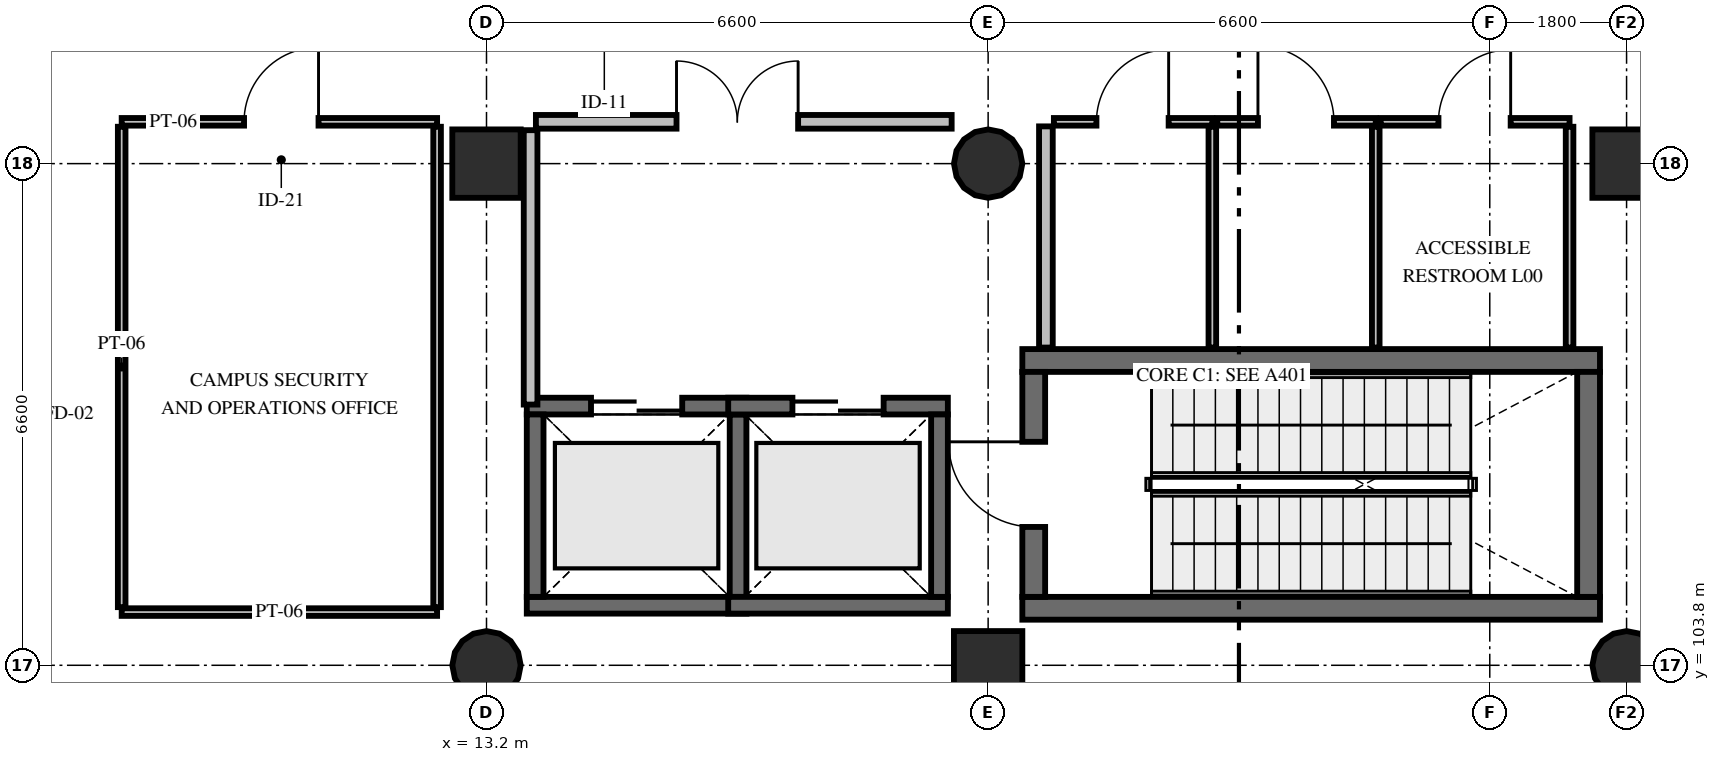
"""IFC4 building model, lengths in metres.
Left out: names, types, materials, properties, quantities, classifications, styles, units other than length and angle.
Written with IfcOpenShell. Run it as: python <this file> out.ifc"""

import sys

from ifc_helpers import new_model, si_unit, direction, frame, frame_2d, origin, origin_2d, place, context, subcontext, project, spatial, rectangle, circle, extrude, element, fill, save


model = new_model("IFC4")
c1 = context("Model", 3, precision=1e-05, world=origin(), true_north=direction((0.0, 1.0)))
c2 = subcontext(c1, "Body", "Model", "MODEL_VIEW")
j1 = project(units=[si_unit("LENGTHUNIT", "METRE"), si_unit("PLANEANGLEUNIT", "RADIAN")], contexts=[c1])
p1 = place(None, origin())
s1 = spatial("IfcSite", under=j1, at=p1, CompositionType="ELEMENT")
p2 = place(p1, origin())
s2 = spatial("IfcBuilding", under=s1, at=p2, CompositionType="ELEMENT")
p3 = place(p2, origin())
s3 = spatial("IfcBuildingStorey", under=s2, at=p3, CompositionType="ELEMENT", Elevation=0.0)
p4 = place(p3, frame((13.2, 103.8, 0.0), z_axis=(0.0, 0.0, 1.0), x_axis=(1.0, 0.0, 0.0)))
e1 = element("IfcColumn", 1, at=p4, inside=s3, PredefinedType="COLUMN", context=c2, shape_type="SweptSolid", body=[
    extrude(circle(Radius=0.45, at=origin_2d()), origin(), (0.0, 0.0, 1.0), 5.4),
])
for number, where, z_axis, x_axis in (
    (2, (13.2, 110.4, 0.0), (0.0, 0.0, 1.0), (1.0, 0.0, 0.0)),
    (3, (19.8, 103.8, 0.0), (0.0, 0.0, 1.0), (1.0, 0.0, 0.0)),
):
    element("IfcColumn", number, at=place(p3, frame(where, z_axis=z_axis, x_axis=x_axis)), inside=s3, PredefinedType="COLUMN", context=c2, shape_type="SweptSolid", body=[
        extrude(rectangle(XDim=0.9, YDim=0.9, at=origin_2d()), origin(), (0.0, 0.0, 1.0), 5.4),
    ])
for number, where, z_axis, x_axis in (
    (4, (19.8, 110.4, 0.0), (0.0, 0.0, 1.0), (1.0, 0.0, 0.0)),
    (5, (28.2, 103.8, 0.0), (0.0, 0.0, 1.0), (1.0, 0.0, 0.0)),
):
    element("IfcColumn", number, at=place(p3, frame(where, z_axis=z_axis, x_axis=x_axis)), inside=s3, PredefinedType="COLUMN", context=c2, shape_type="SweptSolid", body=[
        extrude(circle(Radius=0.45, at=origin_2d()), origin(), (0.0, 0.0, 1.0), 5.4),
    ])
p5 = place(p3, frame((28.2, 110.4, 0.0), z_axis=(0.0, 0.0, 1.0), x_axis=(1.0, 0.0, 0.0)))
e6 = element("IfcColumn", 6, at=p5, inside=s3, PredefinedType="COLUMN", context=c2, shape_type="SweptSolid", body=[
    extrude(rectangle(XDim=0.9, YDim=0.9, at=origin_2d()), origin(), (0.0, 0.0, 1.0), 5.4),
])
for number, where, z_axis, x_axis in (
    (7, (20.25, 104.55, 0.0), (0.0, 0.0, 1.0), (1.0, 0.0, 0.0)),
    (8, (20.25, 107.81, 0.0), (0.0, 0.0, 1.0), (1.0, 0.0, 0.0)),
):
    element("IfcWall", number, at=place(p3, frame(where, z_axis=z_axis, x_axis=x_axis)), inside=s3, PredefinedType="SHEAR", context=c2, shape_type="SweptSolid", body=[
        extrude(rectangle(XDim=7.6, YDim=0.3, at=frame_2d((3.8, 0.0))), origin(), (0.0, 0.0, 1.0), 5.08),
    ])
p6 = place(p3, frame((20.4, 104.7, 0.0), z_axis=(0.0, 0.0, 1.0), x_axis=(0.0, 1.0, 0.0)))
e9 = element("IfcWall", 9, at=p6, inside=s3, PredefinedType="SHEAR", context=c2, shape_type="SweptSolid", body=[
    extrude(rectangle(XDim=2.96, YDim=0.3, at=frame_2d((1.48, 0.0))), origin(), (0.0, 0.0, 1.0), 5.08),
])
p7 = place(p6, frame((0.92, 0.0, 0.0)))
e10 = element("IfcOpeningElement", 10, at=p7, cuts=e9, PredefinedType="OPENING", context=c2, shape_type="SweptSolid", body=[
    extrude(rectangle(XDim=1.12, YDim=2.2, at=frame_2d((0.56, 1.1))), frame((0.0, 0.165, 0.0), z_axis=(0.0, -1.0, 0.0), x_axis=(1.0, 0.0, 0.0)), (0.0, 0.0, 1.0), 0.33),
])
p8 = place(p3, frame((27.7, 104.7, 0.0), z_axis=(0.0, 0.0, 1.0), x_axis=(0.0, 1.0, 0.0)))
e11 = element("IfcWall", 11, at=p8, inside=s3, PredefinedType="SHEAR", context=c2, shape_type="SweptSolid", body=[
    extrude(rectangle(XDim=2.96, YDim=0.3, at=frame_2d((1.48, 0.0))), origin(), (0.0, 0.0, 1.0), 5.08),
])
p9 = place(p3, frame((13.73, 104.59, 0.0), z_axis=(0.0, 0.0, 1.0), x_axis=(1.0, 0.0, 0.0)))
e12 = element("IfcWall", 12, at=p9, inside=s3, PredefinedType="SHEAR", context=c2, shape_type="SweptSolid", body=[
    extrude(rectangle(XDim=2.89, YDim=0.22, at=frame_2d((1.445, 0.0))), origin(), (0.0, 0.0, 1.0), 5.08),
])
p10 = place(p3, frame((13.73, 107.21, 0.0), z_axis=(0.0, 0.0, 1.0), x_axis=(1.0, 0.0, 0.0)))
e13 = element("IfcWall", 13, at=p10, inside=s3, PredefinedType="SHEAR", context=c2, shape_type="SweptSolid", body=[
    extrude(rectangle(XDim=2.89, YDim=0.22, at=frame_2d((1.445, 0.0))), origin(), (0.0, 0.0, 1.0), 5.08),
])
p11 = place(p10, frame((0.845, 0.0, 0.0)))
e14 = element("IfcOpeningElement", 14, at=p11, cuts=e13, PredefinedType="OPENING", context=c2, shape_type="SweptSolid", body=[
    extrude(rectangle(XDim=1.2, YDim=2.2, at=frame_2d((0.6, 1.1))), frame((0.0, 0.125, 0.0), z_axis=(0.0, -1.0, 0.0), x_axis=(1.0, 0.0, 0.0)), (0.0, 0.0, 1.0), 0.25),
])
for number, where, z_axis, x_axis in (
    (15, (13.84, 104.7, 0.0), (0.0, 0.0, 1.0), (0.0, 1.0, 0.0)),
    (16, (16.51, 104.7, 0.0), (0.0, 0.0, 1.0), (0.0, 1.0, 0.0)),
):
    element("IfcWall", number, at=place(p3, frame(where, z_axis=z_axis, x_axis=x_axis)), inside=s3, PredefinedType="SHEAR", context=c2, shape_type="SweptSolid", body=[
        extrude(rectangle(XDim=2.4, YDim=0.22, at=frame_2d((1.2, 0.0))), origin(), (0.0, 0.0, 1.0), 5.08),
    ])
p12 = place(p3, frame((16.38, 104.59, 0.0), z_axis=(0.0, 0.0, 1.0), x_axis=(1.0, 0.0, 0.0)))
e17 = element("IfcWall", 17, at=p12, inside=s3, PredefinedType="SHEAR", context=c2, shape_type="SweptSolid", body=[
    extrude(rectangle(XDim=2.89, YDim=0.22, at=frame_2d((1.445, 0.0))), origin(), (0.0, 0.0, 1.0), 5.08),
])
p13 = place(p3, frame((16.38, 107.21, 0.0), z_axis=(0.0, 0.0, 1.0), x_axis=(1.0, 0.0, 0.0)))
e18 = element("IfcWall", 18, at=p13, inside=s3, PredefinedType="SHEAR", context=c2, shape_type="SweptSolid", body=[
    extrude(rectangle(XDim=2.89, YDim=0.22, at=frame_2d((1.445, 0.0))), origin(), (0.0, 0.0, 1.0), 5.08),
])
p14 = place(p13, frame((0.845, 0.0, 0.0)))
e19 = element("IfcOpeningElement", 19, at=p14, cuts=e18, PredefinedType="OPENING", context=c2, shape_type="SweptSolid", body=[
    extrude(rectangle(XDim=1.2, YDim=2.2, at=frame_2d((0.6, 1.1))), frame((0.0, 0.125, 0.0), z_axis=(0.0, -1.0, 0.0), x_axis=(1.0, 0.0, 0.0)), (0.0, 0.0, 1.0), 0.25),
])
p15 = place(p3, frame((19.16, 104.7, 0.0), z_axis=(0.0, 0.0, 1.0), x_axis=(0.0, 1.0, 0.0)))
e20 = element("IfcWall", 20, at=p15, inside=s3, PredefinedType="SHEAR", context=c2, shape_type="SweptSolid", body=[
    extrude(rectangle(XDim=2.4, YDim=0.22, at=frame_2d((1.2, 0.0))), origin(), (0.0, 0.0, 1.0), 5.08),
])
p16 = place(p3, frame((13.85, 110.95, 0.0), z_axis=(0.0, 0.0, 1.0), x_axis=(1.0, 0.0, 0.0)))
e21 = element("IfcWall", 21, at=p16, inside=s3, PredefinedType="PARTITIONING", context=c2, shape_type="SweptSolid", body=[
    extrude(rectangle(XDim=5.47, YDim=0.18, at=frame_2d((2.735, 0.0))), origin(), (0.0, 0.0, 1.0), 4.895),
])
p17 = place(p16, frame((1.85, 0.0, 0.0)))
e22 = element("IfcOpeningElement", 22, at=p17, cuts=e21, PredefinedType="OPENING", context=c2, shape_type="SweptSolid", body=[
    extrude(rectangle(XDim=1.6, YDim=2.25, at=frame_2d((0.8, 1.125))), frame((0.0, 0.105, 0.0), z_axis=(0.0, -1.0, 0.0), x_axis=(1.0, 0.0, 0.0)), (0.0, 0.0, 1.0), 0.21),
])
p18 = place(p3, frame((13.78, 107.23, 0.0), z_axis=(0.0, 0.0, 1.0), x_axis=(0.0, 1.0, 0.0)))
e23 = element("IfcWall", 23, at=p18, inside=s3, PredefinedType="PARTITIONING", context=c2, shape_type="SweptSolid", body=[
    extrude(rectangle(XDim=3.61, YDim=0.18, at=frame_2d((1.805, 0.0))), origin(), (0.0, 0.0, 1.0), 4.73),
])
p19 = place(p3, frame((20.56, 107.98, 0.0), z_axis=(0.0, 0.0, 1.0), x_axis=(0.0, 1.0, 0.0)))
e24 = element("IfcWall", 24, at=p19, inside=s3, PredefinedType="PARTITIONING", context=c2, shape_type="SweptSolid", body=[
    extrude(rectangle(XDim=2.91, YDim=0.18, at=frame_2d((1.455, 0.0))), origin(), (0.0, 0.0, 1.0), 4.43),
])
p20 = place(p3, frame((20.665, 110.95, 0.0), z_axis=(0.0, 0.0, 1.0), x_axis=(1.0, 0.0, 0.0)))
e25 = element("IfcWall", 25, at=p20, inside=s3, PredefinedType="PARTITIONING", context=c2, shape_type="SweptSolid", body=[
    extrude(rectangle(XDim=2.085, YDim=0.1, at=frame_2d((1.042, 0.0))), origin(), (0.0, 0.0, 1.0), 4.895),
])
p21 = place(p20, frame((0.56, 0.0, 0.0)))
e26 = element("IfcOpeningElement", 26, at=p21, cuts=e25, PredefinedType="OPENING", context=c2, shape_type="SweptSolid", body=[
    extrude(rectangle(XDim=0.95, YDim=2.15, at=frame_2d((0.475, 1.075))), frame((0.0, 0.065, 0.0), z_axis=(0.0, -1.0, 0.0), x_axis=(1.0, 0.0, 0.0)), (0.0, 0.0, 1.0), 0.13),
])
p22 = place(p3, frame((22.75, 107.98, 0.0), z_axis=(0.0, 0.0, 1.0), x_axis=(0.0, 1.0, 0.0)))
e27 = element("IfcWall", 27, at=p22, inside=s3, PredefinedType="PARTITIONING", context=c2, shape_type="SweptSolid", body=[
    extrude(rectangle(XDim=2.905, YDim=0.1, at=frame_2d((1.453, 0.0))), origin(), (0.0, 0.0, 1.0), 4.43),
])
p23 = place(p3, frame((22.815, 110.95, 0.0), z_axis=(0.0, 0.0, 1.0), x_axis=(1.0, 0.0, 0.0)))
e28 = element("IfcWall", 28, at=p23, inside=s3, PredefinedType="PARTITIONING", context=c2, shape_type="SweptSolid", body=[
    extrude(rectangle(XDim=2.085, YDim=0.1, at=frame_2d((1.042, 0.0))), origin(), (0.0, 0.0, 1.0), 5.06),
])
p24 = place(p23, frame((0.535, 0.0, 0.0)))
e29 = element("IfcOpeningElement", 29, at=p24, cuts=e28, PredefinedType="OPENING", context=c2, shape_type="SweptSolid", body=[
    extrude(rectangle(XDim=1.0, YDim=2.15, at=frame_2d((0.5, 1.075))), frame((0.0, 0.065, 0.0), z_axis=(0.0, -1.0, 0.0), x_axis=(1.0, 0.0, 0.0)), (0.0, 0.0, 1.0), 0.13),
])
p25 = place(p3, frame((24.9, 107.98, 0.0), z_axis=(0.0, 0.0, 1.0), x_axis=(0.0, 1.0, 0.0)))
e30 = element("IfcWall", 30, at=p25, inside=s3, PredefinedType="PARTITIONING", context=c2, shape_type="SweptSolid", body=[
    extrude(rectangle(XDim=2.905, YDim=0.1, at=frame_2d((1.453, 0.0))), origin(), (0.0, 0.0, 1.0), 4.43),
])
p26 = place(p3, frame((24.965, 110.95, 0.0), z_axis=(0.0, 0.0, 1.0), x_axis=(1.0, 0.0, 0.0)))
e31 = element("IfcWall", 31, at=p26, inside=s3, PredefinedType="PARTITIONING", context=c2, shape_type="SweptSolid", body=[
    extrude(rectangle(XDim=2.485, YDim=0.1, at=frame_2d((1.242, 0.0))), origin(), (0.0, 0.0, 1.0), 4.895),
])
p27 = place(p26, frame((0.76, 0.0, 0.0)))
e32 = element("IfcOpeningElement", 32, at=p27, cuts=e31, PredefinedType="OPENING", context=c2, shape_type="SweptSolid", body=[
    extrude(rectangle(XDim=0.95, YDim=2.15, at=frame_2d((0.475, 1.075))), frame((0.0, 0.065, 0.0), z_axis=(0.0, -1.0, 0.0), x_axis=(1.0, 0.0, 0.0)), (0.0, 0.0, 1.0), 0.13),
])
p28 = place(p3, frame((27.45, 107.98, 0.0), z_axis=(0.0, 0.0, 1.0), x_axis=(0.0, 1.0, 0.0)))
e33 = element("IfcWall", 33, at=p28, inside=s3, PredefinedType="PARTITIONING", context=c2, shape_type="SweptSolid", body=[
    extrude(rectangle(XDim=2.905, YDim=0.1, at=frame_2d((1.453, 0.0))), origin(), (0.0, 0.0, 1.0), 4.43),
])
p29 = place(p3, frame((8.4, 104.5, 0.0), z_axis=(0.0, 0.0, 1.0), x_axis=(1.0, 0.0, 0.0)))
e34 = element("IfcWall", 34, at=p29, inside=s3, PredefinedType="PARTITIONING", context=c2, shape_type="SweptSolid", body=[
    extrude(rectangle(XDim=4.15, YDim=0.1, at=frame_2d((2.075, 0.0))), origin(), (0.0, 0.0, 1.0), 4.895),
])
p30 = place(p3, frame((8.4, 110.95, 0.0), z_axis=(0.0, 0.0, 1.0), x_axis=(1.0, 0.0, 0.0)))
e35 = element("IfcWall", 35, at=p30, inside=s3, PredefinedType="PARTITIONING", context=c2, shape_type="SweptSolid", body=[
    extrude(rectangle(XDim=4.15, YDim=0.1, at=frame_2d((2.075, 0.0))), origin(), (0.0, 0.0, 1.0), 4.895),
])
p31 = place(p30, frame((1.61, 0.0, 0.0)))
e36 = element("IfcOpeningElement", 36, at=p31, cuts=e35, PredefinedType="OPENING", context=c2, shape_type="SweptSolid", body=[
    extrude(rectangle(XDim=0.98, YDim=2.2, at=frame_2d((0.49, 1.1))), frame((0.0, 0.065, 0.0), z_axis=(0.0, -1.0, 0.0), x_axis=(1.0, 0.0, 0.0)), (0.0, 0.0, 1.0), 0.13),
])
for number, where, z_axis, x_axis in (
    (37, (8.4, 104.565, 0.0), (0.0, 0.0, 1.0), (0.0, 1.0, 0.0)),
    (38, (12.55, 104.565, 0.0), (0.0, 0.0, 1.0), (0.0, 1.0, 0.0)),
):
    element("IfcWall", number, at=place(p3, frame(where, z_axis=z_axis, x_axis=x_axis)), inside=s3, PredefinedType="PARTITIONING", context=c2, shape_type="SweptSolid", body=[
        extrude(rectangle(XDim=6.32, YDim=0.1, at=frame_2d((3.16, 0.0))), origin(), (0.0, 0.0, 1.0), 4.43),
    ])
p32 = place(p7, origin())
e39 = element("IfcDoor", 39, at=p32, inside=s3, OperationType="SINGLE_SWING_RIGHT", PredefinedType="DOOR", context=c2, shape_type="SweptSolid", body=[
    extrude(rectangle(XDim=1.12, YDim=2.2, at=frame_2d((0.56, 1.1))), frame((0.0, 0.025, 0.0), z_axis=(0.0, -1.0, 0.0), x_axis=(1.0, 0.0, 0.0)), (0.0, 0.0, 1.0), 0.05),
])
fill(e10, e39)
p33 = place(p11, origin())
e40 = element("IfcDoor", 40, at=p33, inside=s3, OperationType="DOUBLE_DOOR_SLIDING", PredefinedType="DOOR", context=c2, shape_type="SweptSolid", body=[
    extrude(rectangle(XDim=1.2, YDim=2.2, at=frame_2d((0.6, 1.1))), frame((0.0, 0.025, 0.0), z_axis=(0.0, -1.0, 0.0), x_axis=(1.0, 0.0, 0.0)), (0.0, 0.0, 1.0), 0.05),
])
fill(e14, e40)
p34 = place(p14, origin())
e41 = element("IfcDoor", 41, at=p34, inside=s3, OperationType="DOUBLE_DOOR_SLIDING", PredefinedType="DOOR", context=c2, shape_type="SweptSolid", body=[
    extrude(rectangle(XDim=1.2, YDim=2.2, at=frame_2d((0.6, 1.1))), frame((0.0, 0.025, 0.0), z_axis=(0.0, -1.0, 0.0), x_axis=(1.0, 0.0, 0.0)), (0.0, 0.0, 1.0), 0.05),
])
fill(e19, e41)
p35 = place(p17, origin())
e42 = element("IfcDoor", 42, at=p35, inside=s3, OperationType="DOUBLE_DOOR_SINGLE_SWING", PredefinedType="DOOR", context=c2, shape_type="SweptSolid", body=[
    extrude(rectangle(XDim=1.6, YDim=2.25, at=frame_2d((0.8, 1.125))), frame((0.0, 0.025, 0.0), z_axis=(0.0, -1.0, 0.0), x_axis=(1.0, 0.0, 0.0)), (0.0, 0.0, 1.0), 0.05),
])
fill(e22, e42)
p36 = place(p21, origin())
e43 = element("IfcDoor", 43, at=p36, inside=s3, OperationType="SINGLE_SWING_RIGHT", PredefinedType="DOOR", context=c2, shape_type="SweptSolid", body=[
    extrude(rectangle(XDim=0.95, YDim=2.15, at=frame_2d((0.475, 1.075))), frame((0.0, 0.025, 0.0), z_axis=(0.0, -1.0, 0.0), x_axis=(1.0, 0.0, 0.0)), (0.0, 0.0, 1.0), 0.05),
])
fill(e26, e43)
p37 = place(p24, origin())
e44 = element("IfcDoor", 44, at=p37, inside=s3, OperationType="SINGLE_SWING_LEFT", PredefinedType="DOOR", context=c2, shape_type="SweptSolid", body=[
    extrude(rectangle(XDim=1.0, YDim=2.15, at=frame_2d((0.5, 1.075))), frame((0.0, 0.025, 0.0), z_axis=(0.0, -1.0, 0.0), x_axis=(1.0, 0.0, 0.0)), (0.0, 0.0, 1.0), 0.05),
])
fill(e29, e44)
p38 = place(p27, origin())
e45 = element("IfcDoor", 45, at=p38, inside=s3, OperationType="SINGLE_SWING_RIGHT", PredefinedType="DOOR", context=c2, shape_type="SweptSolid", body=[
    extrude(rectangle(XDim=0.95, YDim=2.15, at=frame_2d((0.475, 1.075))), frame((0.0, 0.025, 0.0), z_axis=(0.0, -1.0, 0.0), x_axis=(1.0, 0.0, 0.0)), (0.0, 0.0, 1.0), 0.05),
])
fill(e32, e45)
p39 = place(p31, origin())
e46 = element("IfcDoor", 46, at=p39, inside=s3, OperationType="SINGLE_SWING_RIGHT", PredefinedType="DOOR", context=c2, shape_type="SweptSolid", body=[
    extrude(rectangle(XDim=0.98, YDim=2.2, at=frame_2d((0.49, 1.1))), frame((0.0, 0.025, 0.0), z_axis=(0.0, -1.0, 0.0), x_axis=(1.0, 0.0, 0.0)), (0.0, 0.0, 1.0), 0.05),
])
fill(e36, e46)
save(model, sys.argv[1])
